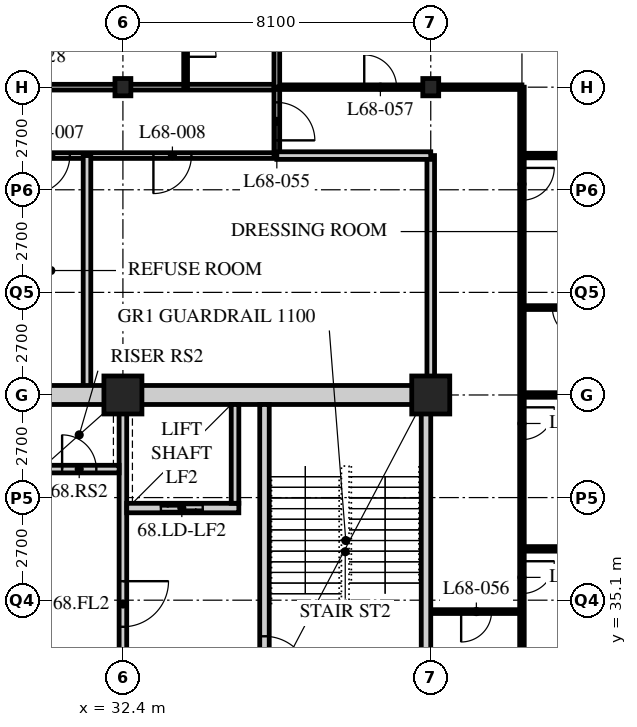
"""IFC4 building model, lengths in metres.
Left out: names, types, materials, properties, quantities, classifications, styles, units other than length and angle.
Written with IfcOpenShell. Run it as: python <this file> out.ifc"""

import sys

from ifc_helpers import new_model, si_unit, direction, frame, frame_2d, origin, origin_2d, place, context, subcontext, project, spatial, rectangle, hollow_rectangle, i_section, extrude, element, fill, save


model = new_model("IFC4")
c1 = context("Model", 3, precision=1e-05, world=origin(), true_north=direction((0.0, 1.0)))
c2 = subcontext(c1, "Body", "Model", "MODEL_VIEW")
j1 = project(units=[si_unit("LENGTHUNIT", "METRE"), si_unit("PLANEANGLEUNIT", "RADIAN")], contexts=[c1])
p1 = place(None, origin())
s1 = spatial("IfcSite", under=j1, at=p1, CompositionType="ELEMENT")
p2 = place(p1, origin())
s2 = spatial("IfcBuilding", under=s1, at=p2, CompositionType="ELEMENT")
p3 = place(p2, frame((0.0, 0.0, 265.8)))
s3 = spatial("IfcBuildingStorey", under=s2, at=p3, CompositionType="ELEMENT", Elevation=265.8)
p4 = place(p3, frame((32.4, 40.5, 0.0), z_axis=(0.0, 0.0, 1.0), x_axis=(1.0, 0.0, 0.0)))
e1 = element("IfcColumn", 1, at=p4, inside=s3, PredefinedType="COLUMN", context=c2, shape_type="SweptSolid", body=[
    extrude(hollow_rectangle(XDim=1.0, YDim=1.0, WallThickness=0.1, at=origin_2d()), origin(), (0.0, 0.0, 1.0), 3.9),
])
p5 = place(p3, frame((32.4, 48.6, 0.0), z_axis=(0.0, 0.0, 1.0), x_axis=(1.0, 0.0, 0.0)))
e2 = element("IfcColumn", 2, at=p5, inside=s3, PredefinedType="COLUMN", context=c2, shape_type="SweptSolid", body=[
    extrude(i_section(OverallWidth=0.418, OverallDepth=0.456, WebThickness=0.042, FlangeThickness=0.067, FilletRadius=0.015, at=origin_2d()), origin(), (0.0, 0.0, 1.0), 3.9),
])
p6 = place(p3, frame((40.5, 40.5, 0.0), z_axis=(0.0, 0.0, 1.0), x_axis=(1.0, 0.0, 0.0)))
e3 = element("IfcColumn", 3, at=p6, inside=s3, PredefinedType="COLUMN", context=c2, shape_type="SweptSolid", body=[
    extrude(hollow_rectangle(XDim=1.0, YDim=1.0, WallThickness=0.1, at=origin_2d()), origin(), (0.0, 0.0, 1.0), 3.9),
])
p7 = place(p3, frame((40.5, 48.6, 0.0), z_axis=(0.0, 0.0, 1.0), x_axis=(1.0, 0.0, 0.0)))
e4 = element("IfcColumn", 4, at=p7, inside=s3, PredefinedType="COLUMN", context=c2, shape_type="SweptSolid", body=[
    extrude(i_section(OverallWidth=0.418, OverallDepth=0.456, WebThickness=0.042, FlangeThickness=0.067, FilletRadius=0.015, at=origin_2d()), origin(), (0.0, 0.0, 1.0), 3.9),
])
p8 = place(p3, frame((8.1, 48.6, 0.0), z_axis=(0.0, 0.0, 1.0), x_axis=(1.0, 0.0, 0.0)))
e5 = element("IfcWall", 5, at=p8, inside=s3, PredefinedType="PARTITIONING", context=c2, shape_type="SweptSolid", body=[
    extrude(rectangle(XDim=28.35, YDim=0.15, at=frame_2d((14.175, 0.0))), origin(), (0.0, 0.0, 1.0), 3.078),
])
p9 = place(p8, frame((4.45, 0.0, 0.0)))
e6 = element("IfcOpeningElement", 6, at=p9, cuts=e5, PredefinedType="OPENING", context=c2, shape_type="SweptSolid", body=[
    extrude(rectangle(XDim=1.0, YDim=2.1, at=frame_2d((0.5, 1.05))), frame((0.0, 0.085, 0.0), z_axis=(0.0, -1.0, 0.0), x_axis=(1.0, 0.0, 0.0)), (0.0, 0.0, 1.0), 0.17),
])
p10 = place(p8, frame((20.65, 0.0, 0.0)))
e7 = element("IfcOpeningElement", 7, at=p10, cuts=e5, PredefinedType="OPENING", context=c2, shape_type="SweptSolid", body=[
    extrude(rectangle(XDim=1.0, YDim=2.1, at=frame_2d((0.5, 1.05))), frame((0.0, 0.085, 0.0), z_axis=(0.0, -1.0, 0.0), x_axis=(1.0, 0.0, 0.0)), (0.0, 0.0, 1.0), 0.17),
])
p11 = place(p8, frame((1.525, 0.0, 0.0)))
e8 = element("IfcOpeningElement", 8, at=p11, cuts=e5, PredefinedType="OPENING", context=c2, shape_type="SweptSolid", body=[
    extrude(rectangle(XDim=1.0, YDim=2.1, at=frame_2d((0.5, 1.05))), frame((0.0, 0.085, 0.0), z_axis=(0.0, -1.0, 0.0), x_axis=(1.0, 0.0, 0.0)), (0.0, 0.0, 1.0), 0.17),
])
p12 = place(p3, frame((29.56, 46.8, 0.0), z_axis=(0.0, 0.0, 1.0), x_axis=(1.0, 0.0, 0.0)))
e9 = element("IfcWall", 9, at=p12, inside=s3, PredefinedType="PARTITIONING", context=c2, shape_type="SweptSolid", body=[
    extrude(rectangle(XDim=6.89, YDim=0.15, at=frame_2d((3.445, 0.0))), origin(), (0.0, 0.0, 1.0), 3.69),
])
p13 = place(p12, frame((0.442, 0.0, 0.0)))
e10 = element("IfcOpeningElement", 10, at=p13, cuts=e9, PredefinedType="OPENING", context=c2, shape_type="SweptSolid", body=[
    extrude(rectangle(XDim=1.0, YDim=2.1, at=frame_2d((0.5, 1.05))), frame((0.0, 0.085, 0.0), z_axis=(0.0, -1.0, 0.0), x_axis=(1.0, 0.0, 0.0)), (0.0, 0.0, 1.0), 0.17),
])
p14 = place(p12, frame((3.642, 0.0, 0.0)))
e11 = element("IfcOpeningElement", 11, at=p14, cuts=e9, PredefinedType="OPENING", context=c2, shape_type="SweptSolid", body=[
    extrude(rectangle(XDim=1.0, YDim=2.1, at=frame_2d((0.5, 1.05))), frame((0.0, 0.085, 0.0), z_axis=(0.0, -1.0, 0.0), x_axis=(1.0, 0.0, 0.0)), (0.0, 0.0, 1.0), 0.17),
])
p15 = place(p3, frame((31.455, 46.8, 0.0), z_axis=(0.0, 0.0, 1.0), x_axis=(0.0, -1.0, 0.0)))
e12 = element("IfcWall", 12, at=p15, inside=s3, PredefinedType="SOLIDWALL", context=c2, shape_type="SweptSolid", body=[
    extrude(rectangle(XDim=6.3, YDim=0.2, at=frame_2d((3.15, 0.0))), origin(), (0.0, 0.0, 1.0), 3.69),
])
p16 = place(p3, frame((36.45, 46.8, 0.0), z_axis=(0.0, 0.0, 1.0), x_axis=(0.0, 1.0, 0.0)))
e13 = element("IfcWall", 13, at=p16, inside=s3, PredefinedType="PARTITIONING", context=c2, shape_type="SweptSolid", body=[
    extrude(rectangle(XDim=1.8, YDim=0.15, at=frame_2d((0.9, 0.0))), origin(), (0.0, 0.0, 1.0), 3.69),
])
p17 = place(p16, frame((0.4, 0.0, 0.0)))
e14 = element("IfcOpeningElement", 14, at=p17, cuts=e13, PredefinedType="OPENING", context=c2, shape_type="SweptSolid", body=[
    extrude(rectangle(XDim=1.0, YDim=2.1, at=frame_2d((0.5, 1.05))), frame((0.0, 0.085, 0.0), z_axis=(0.0, -1.0, 0.0), x_axis=(1.0, 0.0, 0.0)), (0.0, 0.0, 1.0), 0.17),
])
p18 = place(p3, frame((40.5, 40.5, 0.0), z_axis=(0.0, 0.0, 1.0), x_axis=(0.0, 1.0, 0.0)))
e15 = element("IfcWall", 15, at=p18, inside=s3, PredefinedType="SOLIDWALL", context=c2, shape_type="SweptSolid", body=[
    extrude(rectangle(XDim=6.3, YDim=0.2, at=frame_2d((3.15, 0.0))), origin(), (0.0, 0.0, 1.0), 3.078),
])
p19 = place(p3, frame((34.05, 48.6, 0.0), z_axis=(0.0, 0.0, 1.0), x_axis=(0.0, 1.0, 0.0)))
e16 = element("IfcWall", 16, at=p19, inside=s3, PredefinedType="PARTITIONING", context=c2, shape_type="SweptSolid", body=[
    extrude(rectangle(XDim=2.4, YDim=0.1, at=frame_2d((1.2, 0.0))), origin(), (0.0, 0.0, 1.0), 3.69),
])
p20 = place(p19, frame((0.8, 0.0, 0.0)))
e17 = element("IfcOpeningElement", 17, at=p20, cuts=e16, PredefinedType="OPENING", context=c2, shape_type="SweptSolid", body=[
    extrude(rectangle(XDim=0.8, YDim=2.1, at=frame_2d((0.4, 1.05))), frame((0.0, 0.06, 0.0), z_axis=(0.0, -1.0, 0.0), x_axis=(1.0, 0.0, 0.0)), (0.0, 0.0, 1.0), 0.12),
])
p21 = place(p3, frame((40.5, 34.8, 0.0), z_axis=(0.0, 0.0, 1.0), x_axis=(1.0, 0.0, 0.0)))
e18 = element("IfcWall", 18, at=p21, inside=s3, PredefinedType="PARTITIONING", context=c2, shape_type="SweptSolid", body=[
    extrude(rectangle(XDim=2.4, YDim=0.1, at=frame_2d((1.2, 0.0))), origin(), (0.0, 0.0, 1.0), 3.69),
])
p22 = place(p21, frame((0.8, 0.0, 0.0)))
e19 = element("IfcOpeningElement", 19, at=p22, cuts=e18, PredefinedType="OPENING", context=c2, shape_type="SweptSolid", body=[
    extrude(rectangle(XDim=0.8, YDim=2.1, at=frame_2d((0.4, 1.05))), frame((0.0, 0.06, 0.0), z_axis=(0.0, -1.0, 0.0), x_axis=(1.0, 0.0, 0.0)), (0.0, 0.0, 1.0), 0.12),
])
p23 = place(p3, frame((42.9, 48.6, 0.0), z_axis=(0.0, 0.0, 1.0), x_axis=(0.0, -1.0, 0.0)))
e20 = element("IfcWall", 20, at=p23, inside=s3, PredefinedType="PARTITIONING", context=c2, shape_type="SweptSolid", body=[
    extrude(rectangle(XDim=16.2, YDim=0.12, at=frame_2d((8.1, 0.0))), origin(), (0.0, 0.0, 1.0), 3.69),
])
p24 = place(p23, frame((2.125, 0.0, 0.0)))
e21 = element("IfcOpeningElement", 21, at=p24, cuts=e20, PredefinedType="OPENING", context=c2, shape_type="SweptSolid", body=[
    extrude(rectangle(XDim=0.85, YDim=2.1, at=frame_2d((0.425, 1.05))), frame((0.0, 0.07, 0.0), z_axis=(0.0, -1.0, 0.0), x_axis=(1.0, 0.0, 0.0)), (0.0, 0.0, 1.0), 0.14),
])
p25 = place(p23, frame((8.425, 0.0, 0.0)))
e22 = element("IfcOpeningElement", 22, at=p25, cuts=e20, PredefinedType="OPENING", context=c2, shape_type="SweptSolid", body=[
    extrude(rectangle(XDim=0.85, YDim=2.1, at=frame_2d((0.425, 1.05))), frame((0.0, 0.07, 0.0), z_axis=(0.0, -1.0, 0.0), x_axis=(1.0, 0.0, 0.0)), (0.0, 0.0, 1.0), 0.14),
])
p26 = place(p23, frame((12.475, 0.0, 0.0)))
e23 = element("IfcOpeningElement", 23, at=p26, cuts=e20, PredefinedType="OPENING", context=c2, shape_type="SweptSolid", body=[
    extrude(rectangle(XDim=0.85, YDim=2.1, at=frame_2d((0.425, 1.05))), frame((0.0, 0.07, 0.0), z_axis=(0.0, -1.0, 0.0), x_axis=(1.0, 0.0, 0.0)), (0.0, 0.0, 1.0), 0.14),
])
p27 = place(p3, frame((36.45, 48.6, 0.0), z_axis=(0.0, 0.0, 1.0), x_axis=(1.0, 0.0, 0.0)))
e24 = element("IfcWall", 24, at=p27, inside=s3, PredefinedType="PARTITIONING", context=c2, shape_type="SweptSolid", body=[
    extrude(rectangle(XDim=6.45, YDim=0.12, at=frame_2d((3.225, 0.0))), origin(), (0.0, 0.0, 1.0), 3.078),
])
p28 = place(p27, frame((2.3, 0.0, 0.0)))
e25 = element("IfcOpeningElement", 25, at=p28, cuts=e24, PredefinedType="OPENING", context=c2, shape_type="SweptSolid", body=[
    extrude(rectangle(XDim=0.85, YDim=2.1, at=frame_2d((0.425, 1.05))), frame((0.0, 0.07, 0.0), z_axis=(0.0, -1.0, 0.0), x_axis=(1.0, 0.0, 0.0)), (0.0, 0.0, 1.0), 0.14),
])
p29 = place(p3, frame((36.45, 46.8, 0.0), z_axis=(0.0, 0.0, 1.0), x_axis=(1.0, 0.0, 0.0)))
e26 = element("IfcWall", 26, at=p29, inside=s3, PredefinedType="SOLIDWALL", context=c2, shape_type="SweptSolid", body=[
    extrude(rectangle(XDim=4.05, YDim=0.2, at=frame_2d((2.025, 0.0))), origin(), (0.0, 0.0, 1.0), 3.69),
])
p30 = place(p3, frame((42.9, 46.8, 0.0), z_axis=(0.0, 0.0, 1.0), x_axis=(1.0, 0.0, 0.0)))
e27 = element("IfcWall", 27, at=p30, inside=s3, PredefinedType="PARTITIONING", context=c2, shape_type="SweptSolid", body=[
    extrude(rectangle(XDim=13.5, YDim=0.12, at=frame_2d((6.75, 0.0))), origin(), (0.0, 0.0, 1.0), 3.69),
])
p31 = place(p3, frame((36.45, 64.5, 0.0), z_axis=(0.0, 0.0, 1.0), x_axis=(0.0, -1.0, 0.0)))
e28 = element("IfcWall", 28, at=p31, inside=s3, PredefinedType="PARTITIONING", context=c2, shape_type="SweptSolid", body=[
    extrude(rectangle(XDim=15.9, YDim=0.15, at=frame_2d((7.95, 0.0))), origin(), (0.0, 0.0, 1.0), 3.69),
])
p32 = place(p3, frame((42.9, 42.8, 0.0), z_axis=(0.0, 0.0, 1.0), x_axis=(1.0, 0.0, 0.0)))
e29 = element("IfcWall", 29, at=p32, inside=s3, PredefinedType="PARTITIONING", context=c2, shape_type="SweptSolid", body=[
    extrude(rectangle(XDim=2.4, YDim=0.1, at=frame_2d((1.2, 0.0))), origin(), (0.0, 0.0, 1.0), 3.69),
])
p33 = place(p32, frame((0.8, 0.0, 0.0)))
e30 = element("IfcOpeningElement", 30, at=p33, cuts=e29, PredefinedType="OPENING", context=c2, shape_type="SweptSolid", body=[
    extrude(rectangle(XDim=0.8, YDim=2.1, at=frame_2d((0.4, 1.05))), frame((0.0, 0.06, 0.0), z_axis=(0.0, -1.0, 0.0), x_axis=(1.0, 0.0, 0.0)), (0.0, 0.0, 1.0), 0.12),
])
p34 = place(p3, frame((42.9, 40.5, 0.0), z_axis=(0.0, 0.0, 1.0), x_axis=(1.0, 0.0, 0.0)))
e31 = element("IfcWall", 31, at=p34, inside=s3, PredefinedType="PARTITIONING", context=c2, shape_type="SweptSolid", body=[
    extrude(rectangle(XDim=13.5, YDim=0.12, at=frame_2d((6.75, 0.0))), origin(), (0.0, 0.0, 1.0), 3.078),
])
p35 = place(p3, frame((42.9, 36.45, 0.0), z_axis=(0.0, 0.0, 1.0), x_axis=(1.0, 0.0, 0.0)))
e32 = element("IfcWall", 32, at=p35, inside=s3, PredefinedType="PARTITIONING", context=c2, shape_type="SweptSolid", body=[
    extrude(rectangle(XDim=13.5, YDim=0.12, at=frame_2d((6.75, 0.0))), origin(), (0.0, 0.0, 1.0), 3.69),
])
p36 = place(p3, frame((15.95, 40.5, 0.0), z_axis=(0.0, 0.0, 1.0), x_axis=(1.0, 0.0, 0.0)))
e33 = element("IfcWall", 33, at=p36, inside=s3, PredefinedType="SOLIDWALL", context=c2, shape_type="SweptSolid", body=[
    extrude(rectangle(XDim=24.55, YDim=0.5, at=frame_2d((12.275, 0.0))), origin(), (0.0, 0.0, 1.0), 3.04),
])
p37 = place(p36, frame((11.5, 0.0, 0.0)))
e34 = element("IfcOpeningElement", 34, at=p37, cuts=e33, PredefinedType="OPENING", context=c2, shape_type="SweptSolid", body=[
    extrude(rectangle(XDim=1.8, YDim=2.4, at=frame_2d((0.9, 1.2))), frame((0.0, 0.26, 0.0), z_axis=(0.0, -1.0, 0.0), x_axis=(1.0, 0.0, 0.0)), (0.0, 0.0, 1.0), 0.52),
])
p38 = place(p3, frame((40.375, 24.55, 0.0), z_axis=(0.0, 0.0, 1.0), x_axis=(0.0, 1.0, 0.0)))
e35 = element("IfcWall", 35, at=p38, inside=s3, PredefinedType="SOLIDWALL", context=c2, shape_type="SweptSolid", body=[
    extrude(rectangle(XDim=15.7, YDim=0.25, at=frame_2d((7.85, 0.0))), origin(), (0.0, 0.0, 1.0), 3.078),
])
p39 = place(p3, frame((32.4, 32.5, 0.0), z_axis=(0.0, 0.0, 1.0), x_axis=(0.0, 1.0, 0.0)))
e36 = element("IfcWall", 36, at=p39, inside=s3, PredefinedType="SOLIDWALL", context=c2, shape_type="SweptSolid", body=[
    extrude(rectangle(XDim=7.75, YDim=0.2, at=frame_2d((3.875, 0.0))), origin(), (0.0, 0.0, 1.0), 3.078),
])
p40 = place(p39, frame((1.9, 0.0, 0.0)))
e37 = element("IfcOpeningElement", 37, at=p40, cuts=e36, PredefinedType="OPENING", context=c2, shape_type="SweptSolid", body=[
    extrude(rectangle(XDim=1.2, YDim=2.1, at=frame_2d((0.6, 1.05))), frame((0.0, 0.11, 0.0), z_axis=(0.0, -1.0, 0.0), x_axis=(1.0, 0.0, 0.0)), (0.0, 0.0, 1.0), 0.22),
])
p41 = place(p3, frame((36.125, 32.5, 0.0), z_axis=(0.0, 0.0, 1.0), x_axis=(0.0, 1.0, 0.0)))
e38 = element("IfcWall", 38, at=p41, inside=s3, PredefinedType="SOLIDWALL", context=c2, shape_type="SweptSolid", body=[
    extrude(rectangle(XDim=7.75, YDim=0.25, at=frame_2d((3.875, 0.0))), origin(), (0.0, 0.0, 1.0), 3.69),
])
p42 = place(p41, frame((0.45, 0.0, 0.0)))
e39 = element("IfcOpeningElement", 39, at=p42, cuts=e38, PredefinedType="OPENING", context=c2, shape_type="SweptSolid", body=[
    extrude(rectangle(XDim=1.2, YDim=2.1, at=frame_2d((0.6, 1.05))), frame((0.0, 0.135, 0.0), z_axis=(0.0, -1.0, 0.0), x_axis=(1.0, 0.0, 0.0)), (0.0, 0.0, 1.0), 0.27),
])
p43 = place(p3, frame((32.5, 37.525, 0.0), z_axis=(0.0, 0.0, 1.0), x_axis=(1.0, 0.0, 0.0)))
e40 = element("IfcWall", 40, at=p43, inside=s3, PredefinedType="SOLIDWALL", context=c2, shape_type="SweptSolid", body=[
    extrude(rectangle(XDim=2.95, YDim=0.25, at=frame_2d((1.475, 0.0))), origin(), (0.0, 0.0, 1.0), 3.69),
])
p44 = place(p43, frame((0.9, 0.0, 0.0)))
e41 = element("IfcOpeningElement", 41, at=p44, cuts=e40, PredefinedType="OPENING", context=c2, shape_type="SweptSolid", body=[
    extrude(rectangle(XDim=1.1, YDim=2.4, at=frame_2d((0.55, 1.2))), frame((0.0, 0.135, 0.0), z_axis=(0.0, -1.0, 0.0), x_axis=(1.0, 0.0, 0.0)), (0.0, 0.0, 1.0), 0.27),
])
p45 = place(p3, frame((35.35, 37.65, 0.0), z_axis=(0.0, 0.0, 1.0), x_axis=(0.0, 1.0, 0.0)))
e42 = element("IfcWall", 42, at=p45, inside=s3, PredefinedType="SOLIDWALL", context=c2, shape_type="SweptSolid", body=[
    extrude(rectangle(XDim=2.6, YDim=0.2, at=frame_2d((1.3, 0.0))), origin(), (0.0, 0.0, 1.0), 3.69),
])
p46 = place(p3, frame((30.15, 38.55, 0.0), z_axis=(0.0, 0.0, 1.0), x_axis=(1.0, 0.0, 0.0)))
e43 = element("IfcWall", 43, at=p46, inside=s3, PredefinedType="SOLIDWALL", context=c2, shape_type="SweptSolid", body=[
    extrude(rectangle(XDim=2.15, YDim=0.2, at=frame_2d((1.075, 0.0))), origin(), (0.0, 0.0, 1.0), 3.69),
])
p47 = place(p46, frame((0.65, 0.0, 0.0)))
e44 = element("IfcOpeningElement", 44, at=p47, cuts=e43, PredefinedType="OPENING", context=c2, shape_type="SweptSolid", body=[
    extrude(rectangle(XDim=0.9, YDim=2.1, at=frame_2d((0.45, 1.05))), frame((0.0, 0.11, 0.0), z_axis=(0.0, -1.0, 0.0), x_axis=(1.0, 0.0, 0.0)), (0.0, 0.0, 1.0), 0.22),
])
p48 = place(p13, origin())
e45 = element("IfcDoor", 45, at=p48, inside=s3, OperationType="SINGLE_SWING_RIGHT", PredefinedType="DOOR", context=c2, shape_type="SweptSolid", body=[
    extrude(rectangle(XDim=1.0, YDim=2.1, at=frame_2d((0.5, 1.05))), frame((0.0, 0.025, 0.0), z_axis=(0.0, -1.0, 0.0), x_axis=(1.0, 0.0, 0.0)), (0.0, 0.0, 1.0), 0.05),
])
fill(e10, e45)
p49 = place(p14, origin())
e46 = element("IfcDoor", 46, at=p49, inside=s3, OperationType="SINGLE_SWING_RIGHT", PredefinedType="DOOR", context=c2, shape_type="SweptSolid", body=[
    extrude(rectangle(XDim=1.0, YDim=2.1, at=frame_2d((0.5, 1.05))), frame((0.0, 0.025, 0.0), z_axis=(0.0, -1.0, 0.0), x_axis=(1.0, 0.0, 0.0)), (0.0, 0.0, 1.0), 0.05),
])
fill(e11, e46)
p50 = place(p20, origin())
e47 = element("IfcDoor", 47, at=p50, inside=s3, OperationType="SINGLE_SWING_RIGHT", PredefinedType="DOOR", context=c2, shape_type="SweptSolid", body=[
    extrude(rectangle(XDim=0.8, YDim=2.1, at=frame_2d((0.4, 1.05))), frame((0.0, 0.025, 0.0), z_axis=(0.0, -1.0, 0.0), x_axis=(1.0, 0.0, 0.0)), (0.0, 0.0, 1.0), 0.05),
])
fill(e17, e47)
p51 = place(p17, origin())
e48 = element("IfcDoor", 48, at=p51, inside=s3, OperationType="SINGLE_SWING_RIGHT", PredefinedType="DOOR", context=c2, shape_type="SweptSolid", body=[
    extrude(rectangle(XDim=1.0, YDim=2.1, at=frame_2d((0.5, 1.05))), frame((0.0, 0.025, 0.0), z_axis=(0.0, -1.0, 0.0), x_axis=(1.0, 0.0, 0.0)), (0.0, 0.0, 1.0), 0.05),
])
fill(e14, e48)
p52 = place(p22, origin())
e49 = element("IfcDoor", 49, at=p52, inside=s3, OperationType="SINGLE_SWING_RIGHT", PredefinedType="DOOR", context=c2, shape_type="SweptSolid", body=[
    extrude(rectangle(XDim=0.8, YDim=2.1, at=frame_2d((0.4, 1.05))), frame((0.0, 0.025, 0.0), z_axis=(0.0, -1.0, 0.0), x_axis=(1.0, 0.0, 0.0)), (0.0, 0.0, 1.0), 0.05),
])
fill(e19, e49)
p53 = place(p28, origin())
e50 = element("IfcDoor", 50, at=p53, inside=s3, OperationType="SINGLE_SWING_LEFT", PredefinedType="DOOR", context=c2, shape_type="SweptSolid", body=[
    extrude(rectangle(XDim=0.85, YDim=2.1, at=frame_2d((0.425, 1.05))), frame((0.0, 0.025, 0.0), z_axis=(0.0, -1.0, 0.0), x_axis=(1.0, 0.0, 0.0)), (0.0, 0.0, 1.0), 0.05),
])
fill(e25, e50)
p54 = place(p33, origin())
e51 = element("IfcDoor", 51, at=p54, inside=s3, OperationType="SINGLE_SWING_LEFT", PredefinedType="DOOR", context=c2, shape_type="SweptSolid", body=[
    extrude(rectangle(XDim=0.8, YDim=2.1, at=frame_2d((0.4, 1.05))), frame((0.0, 0.025, 0.0), z_axis=(0.0, -1.0, 0.0), x_axis=(1.0, 0.0, 0.0)), (0.0, 0.0, 1.0), 0.05),
])
fill(e30, e51)
p55 = place(p24, origin())
e52 = element("IfcDoor", 52, at=p55, inside=s3, OperationType="SINGLE_SWING_LEFT", PredefinedType="DOOR", context=c2, shape_type="SweptSolid", body=[
    extrude(rectangle(XDim=0.85, YDim=2.1, at=frame_2d((0.425, 1.05))), frame((0.0, 0.025, 0.0), z_axis=(0.0, -1.0, 0.0), x_axis=(1.0, 0.0, 0.0)), (0.0, 0.0, 1.0), 0.05),
])
fill(e21, e52)
p56 = place(p25, origin())
e53 = element("IfcDoor", 53, at=p56, inside=s3, OperationType="SINGLE_SWING_LEFT", PredefinedType="DOOR", context=c2, shape_type="SweptSolid", body=[
    extrude(rectangle(XDim=0.85, YDim=2.1, at=frame_2d((0.425, 1.05))), frame((0.0, 0.025, 0.0), z_axis=(0.0, -1.0, 0.0), x_axis=(1.0, 0.0, 0.0)), (0.0, 0.0, 1.0), 0.05),
])
fill(e22, e53)
p57 = place(p26, origin())
e54 = element("IfcDoor", 54, at=p57, inside=s3, OperationType="SINGLE_SWING_LEFT", PredefinedType="DOOR", context=c2, shape_type="SweptSolid", body=[
    extrude(rectangle(XDim=0.85, YDim=2.1, at=frame_2d((0.425, 1.05))), frame((0.0, 0.025, 0.0), z_axis=(0.0, -1.0, 0.0), x_axis=(1.0, 0.0, 0.0)), (0.0, 0.0, 1.0), 0.05),
])
fill(e23, e54)
p58 = place(p42, origin())
e55 = element("IfcDoor", 55, at=p58, inside=s3, OperationType="SINGLE_SWING_RIGHT", PredefinedType="DOOR", context=c2, shape_type="SweptSolid", body=[
    extrude(rectangle(XDim=1.2, YDim=2.1, at=frame_2d((0.6, 1.05))), frame((0.0, 0.025, 0.0), z_axis=(0.0, -1.0, 0.0), x_axis=(1.0, 0.0, 0.0)), (0.0, 0.0, 1.0), 0.05),
])
fill(e39, e55)
p59 = place(p40, origin())
e56 = element("IfcDoor", 56, at=p59, inside=s3, OperationType="SINGLE_SWING_LEFT", PredefinedType="DOOR", context=c2, shape_type="SweptSolid", body=[
    extrude(rectangle(XDim=1.2, YDim=2.1, at=frame_2d((0.6, 1.05))), frame((0.0, 0.025, 0.0), z_axis=(0.0, -1.0, 0.0), x_axis=(1.0, 0.0, 0.0)), (0.0, 0.0, 1.0), 0.05),
])
fill(e37, e56)
p60 = place(p47, origin())
e57 = element("IfcDoor", 57, at=p60, inside=s3, OperationType="SINGLE_SWING_LEFT", PredefinedType="DOOR", context=c2, shape_type="SweptSolid", body=[
    extrude(rectangle(XDim=0.9, YDim=2.1, at=frame_2d((0.45, 1.05))), frame((0.0, 0.025, 0.0), z_axis=(0.0, -1.0, 0.0), x_axis=(1.0, 0.0, 0.0)), (0.0, 0.0, 1.0), 0.05),
])
fill(e44, e57)
p61 = place(p44, origin())
e58 = element("IfcDoor", 58, at=p61, inside=s3, OperationType="DOUBLE_DOOR_SLIDING", PredefinedType="DOOR", context=c2, shape_type="SweptSolid", body=[
    extrude(rectangle(XDim=1.1, YDim=2.4, at=frame_2d((0.55, 1.2))), frame((0.0, 0.025, 0.0), z_axis=(0.0, -1.0, 0.0), x_axis=(1.0, 0.0, 0.0)), (0.0, 0.0, 1.0), 0.05),
])
fill(e41, e58)
save(model, sys.argv[1])
